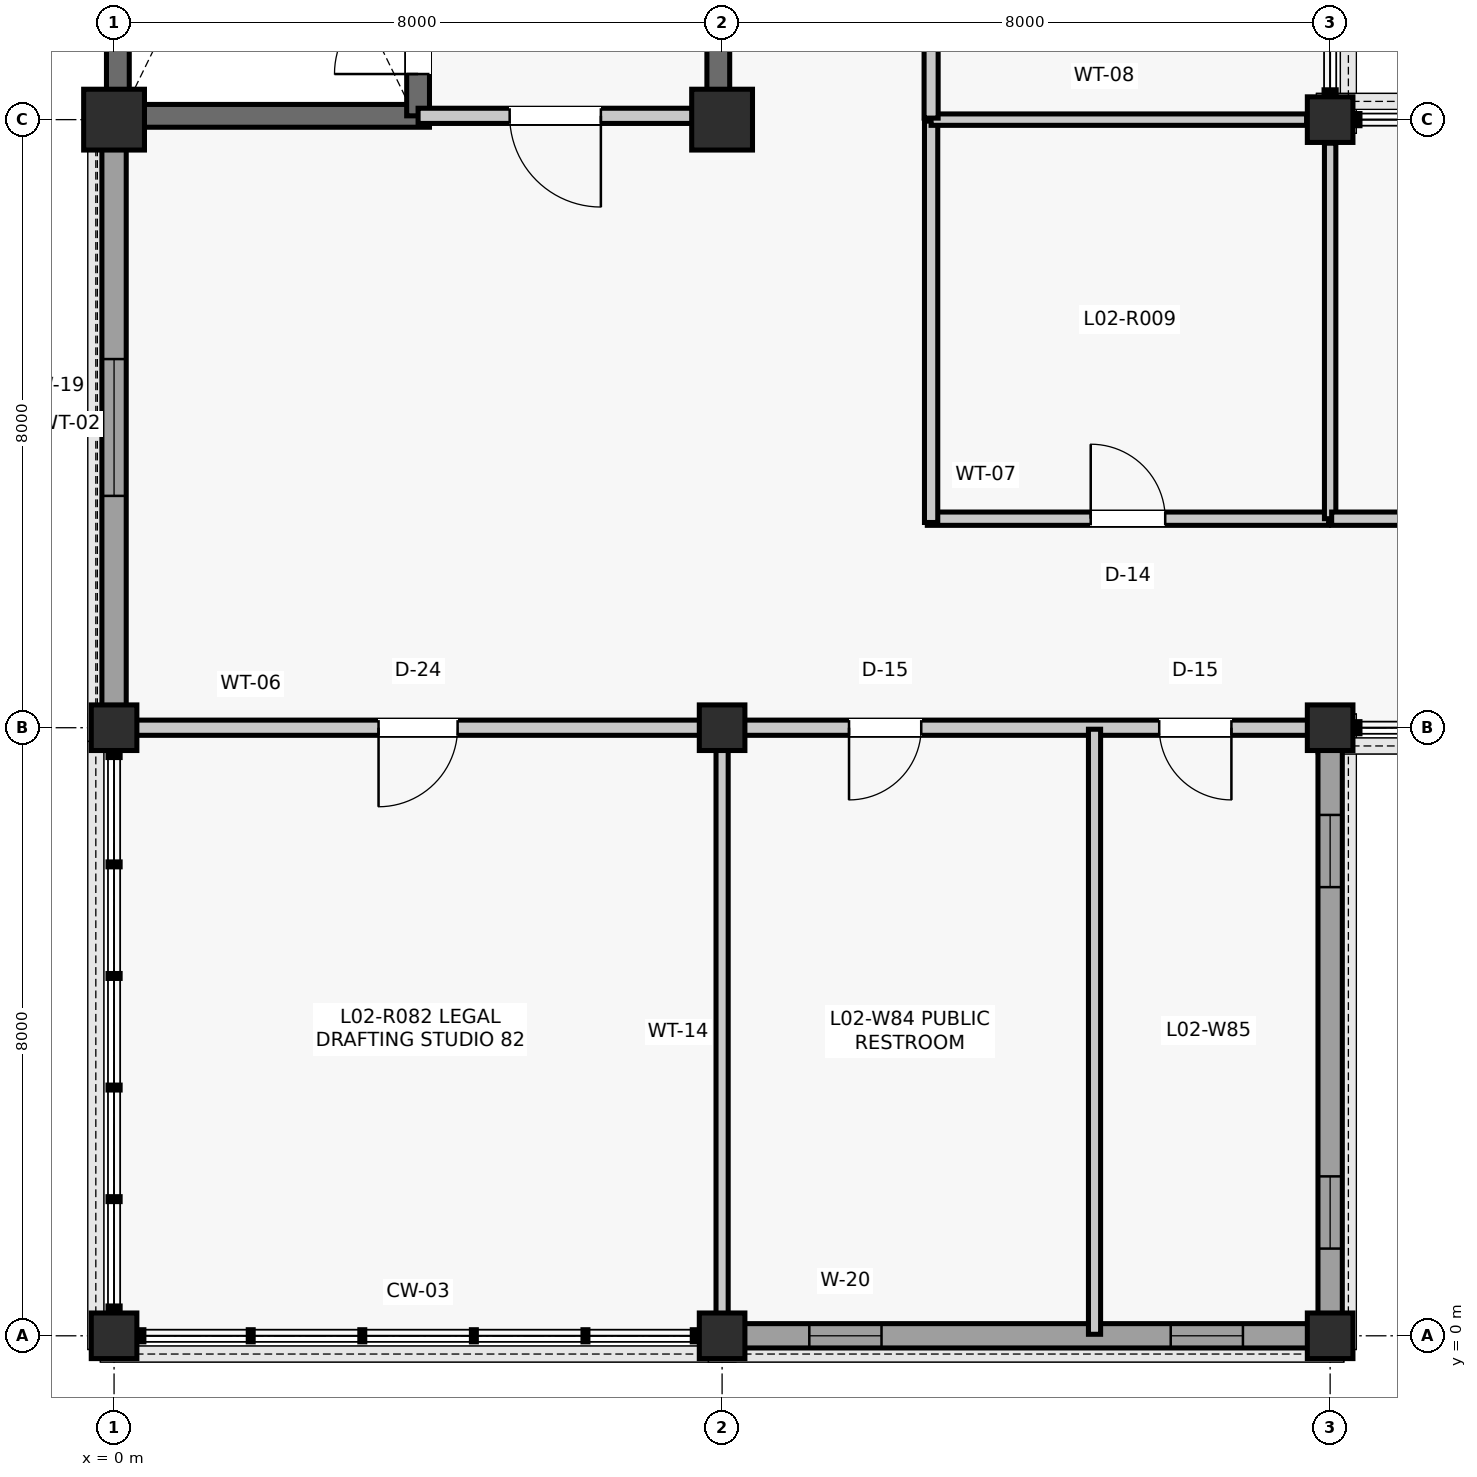
"""IFC4 building model, lengths in metres.
Left out: names, types, materials, properties, quantities, classifications, styles, units other than length and angle.
Written with IfcOpenShell. Run it as: python <this file> out.ifc"""

import sys

from ifc_helpers import new_model, si_unit, direction, frame, frame_2d, origin, origin_2d, place, context, subcontext, project, spatial, rectangle, extrude, element, fill, save


model = new_model("IFC4")
c1 = context("Model", 3, precision=1e-05, world=origin(), true_north=direction((0.0, 1.0)))
c2 = subcontext(c1, "Body", "Model", "MODEL_VIEW")
j1 = project(units=[si_unit("LENGTHUNIT", "METRE"), si_unit("PLANEANGLEUNIT", "RADIAN")], contexts=[c1])
p1 = place(None, origin())
s1 = spatial("IfcSite", under=j1, at=p1, CompositionType="ELEMENT")
p2 = place(p1, origin())
s2 = spatial("IfcBuilding", under=s1, at=p2, CompositionType="ELEMENT")
p3 = place(p2, frame((0.0, 0.0, 9.9)))
s3 = spatial("IfcBuildingStorey", under=s2, at=p3, CompositionType="ELEMENT", Elevation=9.9)
for number, where, z_axis, x_axis in (
    (1, (0.0, 0.0, 0.0), (0.0, 0.0, 1.0), (1.0, 0.0, 0.0)),
    (2, (0.0, 8.0, 0.0), (0.0, 0.0, 1.0), (1.0, 0.0, 0.0)),
):
    element("IfcColumn", number, at=place(p3, frame(where, z_axis=z_axis, x_axis=x_axis)), inside=s3, PredefinedType="COLUMN", context=c2, shape_type="SweptSolid", body=[
        extrude(rectangle(XDim=0.6, YDim=0.6, at=origin_2d()), origin(), (0.0, 0.0, 1.0), 3.96),
    ])
p4 = place(p3, frame((0.0, 16.0, 0.0), z_axis=(0.0, 0.0, 1.0), x_axis=(1.0, 0.0, 0.0)))
e3 = element("IfcColumn", 3, at=p4, inside=s3, PredefinedType="COLUMN", context=c2, shape_type="SweptSolid", body=[
    extrude(rectangle(XDim=0.8, YDim=0.8, at=origin_2d()), origin(), (0.0, 0.0, 1.0), 3.96),
])
for number, where, z_axis, x_axis in (
    (4, (8.0, 0.0, 0.0), (0.0, 0.0, 1.0), (1.0, 0.0, 0.0)),
    (5, (8.0, 8.0, 0.0), (0.0, 0.0, 1.0), (1.0, 0.0, 0.0)),
):
    element("IfcColumn", number, at=place(p3, frame(where, z_axis=z_axis, x_axis=x_axis)), inside=s3, PredefinedType="COLUMN", context=c2, shape_type="SweptSolid", body=[
        extrude(rectangle(XDim=0.6, YDim=0.6, at=origin_2d()), origin(), (0.0, 0.0, 1.0), 3.96),
    ])
p5 = place(p3, frame((8.0, 16.0, 0.0), z_axis=(0.0, 0.0, 1.0), x_axis=(1.0, 0.0, 0.0)))
e6 = element("IfcColumn", 6, at=p5, inside=s3, PredefinedType="COLUMN", context=c2, shape_type="SweptSolid", body=[
    extrude(rectangle(XDim=0.8, YDim=0.8, at=origin_2d()), origin(), (0.0, 0.0, 1.0), 3.96),
])
for number, where, z_axis, x_axis in (
    (7, (16.0, 0.0, 0.0), (0.0, 0.0, 1.0), (1.0, 0.0, 0.0)),
    (8, (16.0, 8.0, 0.0), (0.0, 0.0, 1.0), (1.0, 0.0, 0.0)),
    (9, (16.0, 16.0, 0.0), (0.0, 0.0, 1.0), (1.0, 0.0, 0.0)),
):
    element("IfcColumn", number, at=place(p3, frame(where, z_axis=z_axis, x_axis=x_axis)), inside=s3, PredefinedType="COLUMN", context=c2, shape_type="SweptSolid", body=[
        extrude(rectangle(XDim=0.6, YDim=0.6, at=origin_2d()), origin(), (0.0, 0.0, 1.0), 3.96),
    ])
p6 = place(p3, frame((0.0, 8.285, 0.0), z_axis=(0.0, 0.0, 1.0), x_axis=(0.0, 1.0, 0.0)))
e10 = element("IfcWall", 10, at=p6, inside=s3, PredefinedType="SOLIDWALL", context=c2, shape_type="SweptSolid", body=[
    extrude(rectangle(XDim=7.33, YDim=0.32, at=frame_2d((3.665, 0.0))), origin(), (0.0, 0.0, 1.0), 3.362),
])
p7 = place(p6, frame((2.765, 0.0, 1.35)))
e11 = element("IfcOpeningElement", 11, at=p7, cuts=e10, PredefinedType="OPENING", context=c2, shape_type="SweptSolid", body=[
    extrude(rectangle(XDim=1.8, YDim=1.2, at=frame_2d((0.9, 0.6))), frame((0.0, 0.17, 0.0), z_axis=(0.0, -1.0, 0.0), x_axis=(1.0, 0.0, 0.0)), (0.0, 0.0, 1.0), 0.34),
])
p8 = place(p3, frame((8.285, 0.0, 0.0), z_axis=(0.0, 0.0, 1.0), x_axis=(1.0, 0.0, 0.0)))
e12 = element("IfcWall", 12, at=p8, inside=s3, PredefinedType="SOLIDWALL", context=c2, shape_type="SweptSolid", body=[
    extrude(rectangle(XDim=7.43, YDim=0.32, at=frame_2d((3.715, 0.0))), origin(), (0.0, 0.0, 1.0), 3.362),
])
p9 = place(p8, frame((0.862, 0.0, 1.2)))
e13 = element("IfcOpeningElement", 13, at=p9, cuts=e12, PredefinedType="OPENING", context=c2, shape_type="SweptSolid", body=[
    extrude(rectangle(XDim=0.95, YDim=1.4, at=frame_2d((0.475, 0.7))), frame((0.0, 0.17, 0.0), z_axis=(0.0, -1.0, 0.0), x_axis=(1.0, 0.0, 0.0)), (0.0, 0.0, 1.0), 0.34),
])
p10 = place(p8, frame((5.618, 0.0, 1.2)))
e14 = element("IfcOpeningElement", 14, at=p10, cuts=e12, PredefinedType="OPENING", context=c2, shape_type="SweptSolid", body=[
    extrude(rectangle(XDim=0.95, YDim=1.4, at=frame_2d((0.475, 0.7))), frame((0.0, 0.17, 0.0), z_axis=(0.0, -1.0, 0.0), x_axis=(1.0, 0.0, 0.0)), (0.0, 0.0, 1.0), 0.34),
])
p11 = place(p3, frame((16.0, 0.285, 0.0), z_axis=(0.0, 0.0, 1.0), x_axis=(0.0, 1.0, 0.0)))
e15 = element("IfcWall", 15, at=p11, inside=s3, PredefinedType="SOLIDWALL", context=c2, shape_type="SweptSolid", body=[
    extrude(rectangle(XDim=7.43, YDim=0.32, at=frame_2d((3.715, 0.0))), origin(), (0.0, 0.0, 1.0), 3.295),
])
p12 = place(p11, frame((0.862, 0.0, 1.2)))
e16 = element("IfcOpeningElement", 16, at=p12, cuts=e15, PredefinedType="OPENING", context=c2, shape_type="SweptSolid", body=[
    extrude(rectangle(XDim=0.95, YDim=1.4, at=frame_2d((0.475, 0.7))), frame((0.0, 0.17, 0.0), z_axis=(0.0, -1.0, 0.0), x_axis=(1.0, 0.0, 0.0)), (0.0, 0.0, 1.0), 0.34),
])
p13 = place(p11, frame((5.618, 0.0, 1.2)))
e17 = element("IfcOpeningElement", 17, at=p13, cuts=e15, PredefinedType="OPENING", context=c2, shape_type="SweptSolid", body=[
    extrude(rectangle(XDim=0.95, YDim=1.4, at=frame_2d((0.475, 0.7))), frame((0.0, 0.17, 0.0), z_axis=(0.0, -1.0, 0.0), x_axis=(1.0, 0.0, 0.0)), (0.0, 0.0, 1.0), 0.34),
])
for number, where, z_axis, x_axis in (
    (18, (0.05, 16.29, 0.0), (0.0, 0.0, 1.0), (0.0, 1.0, 0.0)),
    (19, (7.95, 16.29, 0.0), (0.0, 0.0, 1.0), (0.0, 1.0, 0.0)),
):
    element("IfcWall", number, at=place(p3, frame(where, z_axis=z_axis, x_axis=x_axis)), inside=s3, PredefinedType="SHEAR", context=c2, shape_type="SweptSolid", body=[
        extrude(rectangle(XDim=7.42, YDim=0.3, at=frame_2d((3.71, 0.0))), origin(), (0.0, 0.0, 1.0), 3.705),
    ])
p14 = place(p3, frame((0.29, 16.05, 0.0), z_axis=(0.0, 0.0, 1.0), x_axis=(1.0, 0.0, 0.0)))
e20 = element("IfcWall", 20, at=p14, inside=s3, PredefinedType="SHEAR", context=c2, shape_type="SweptSolid", body=[
    extrude(rectangle(XDim=3.86, YDim=0.3, at=frame_2d((1.93, 0.0))), origin(), (0.0, 0.0, 1.0), 3.705),
])
p15 = place(p3, frame((4.0, 16.05, 0.0), z_axis=(0.0, 0.0, 1.0), x_axis=(0.0, 1.0, 0.0)))
e21 = element("IfcWall", 21, at=p15, inside=s3, PredefinedType="SHEAR", context=c2, shape_type="SweptSolid", body=[
    extrude(rectangle(XDim=7.9, YDim=0.3, at=frame_2d((3.95, 0.0))), origin(), (0.0, 0.0, 1.0), 3.705),
])
p16 = place(p15, frame((0.55, 0.0, 0.0)))
e22 = element("IfcOpeningElement", 22, at=p16, cuts=e21, PredefinedType="OPENING", context=c2, shape_type="SweptSolid", body=[
    extrude(rectangle(XDim=1.1, YDim=2.15, at=frame_2d((0.55, 1.075))), frame((0.0, 0.16, 0.0), z_axis=(0.0, -1.0, 0.0), x_axis=(1.0, 0.0, 0.0)), (0.0, 0.0, 1.0), 0.32),
])
p17 = place(p3, frame((4.0, 16.05, 0.0), z_axis=(0.0, 0.0, 1.0), x_axis=(1.0, 0.0, 0.0)))
e23 = element("IfcWall", 23, at=p17, inside=s3, PredefinedType="PARTITIONING", context=c2, shape_type="SweptSolid", body=[
    extrude(rectangle(XDim=3.61, YDim=0.2, at=frame_2d((1.805, 0.0))), origin(), (0.0, 0.0, 1.0), 3.156),
])
p18 = place(p17, frame((1.205, 0.0, 0.0)))
e24 = element("IfcOpeningElement", 24, at=p18, cuts=e23, PredefinedType="OPENING", context=c2, shape_type="SweptSolid", body=[
    extrude(rectangle(XDim=1.2, YDim=2.15, at=frame_2d((0.6, 1.075))), frame((0.0, 0.11, 0.0), z_axis=(0.0, -1.0, 0.0), x_axis=(1.0, 0.0, 0.0)), (0.0, 0.0, 1.0), 0.22),
])
p19 = place(p3, frame((10.7, 10.75, 0.0), z_axis=(0.0, 0.0, 1.0), x_axis=(1.0, 0.0, 0.0)))
e25 = element("IfcWall", 25, at=p19, inside=s3, PredefinedType="PARTITIONING", context=c2, shape_type="SweptSolid", body=[
    extrude(rectangle(XDim=5.28, YDim=0.175, at=frame_2d((2.64, 0.0))), origin(), (0.0, 0.0, 1.0), 3.236),
])
p20 = place(p19, frame((2.15, 0.0, 0.0)))
e26 = element("IfcOpeningElement", 26, at=p20, cuts=e25, PredefinedType="OPENING", context=c2, shape_type="SweptSolid", body=[
    extrude(rectangle(XDim=0.98, YDim=2.15, at=frame_2d((0.49, 1.075))), frame((0.0, 0.097, 0.0), z_axis=(0.0, -1.0, 0.0), x_axis=(1.0, 0.0, 0.0)), (0.0, 0.0, 1.0), 0.195),
])
p21 = place(p3, frame((10.75, 10.7, 0.0), z_axis=(0.0, 0.0, 1.0), x_axis=(0.0, 1.0, 0.0)))
e27 = element("IfcWall", 27, at=p21, inside=s3, PredefinedType="PARTITIONING", context=c2, shape_type="SweptSolid", body=[
    extrude(rectangle(XDim=5.28, YDim=0.175, at=frame_2d((2.64, 0.0))), origin(), (0.0, 0.0, 1.0), 3.166),
])
p22 = place(p3, frame((10.75, 16.0, 0.0), z_axis=(0.0, 0.0, 1.0), x_axis=(1.0, 0.0, 0.0)))
e28 = element("IfcWall", 28, at=p22, inside=s3, PredefinedType="PARTITIONING", context=c2, shape_type="SweptSolid", body=[
    extrude(rectangle(XDim=4.94, YDim=0.15, at=frame_2d((2.47, 0.0))), origin(), (0.0, 0.0, 1.0), 3.166),
])
p23 = place(p3, frame((16.0, 10.75, 0.0), z_axis=(0.0, 0.0, 1.0), x_axis=(0.0, 1.0, 0.0)))
e29 = element("IfcWall", 29, at=p23, inside=s3, PredefinedType="PARTITIONING", context=c2, shape_type="SweptSolid", body=[
    extrude(rectangle(XDim=4.94, YDim=0.15, at=frame_2d((2.47, 0.0))), origin(), (0.0, 0.0, 1.0), 3.236),
])
p24 = place(p3, frame((10.75, 16.02, 0.0), z_axis=(0.0, 0.0, 1.0), x_axis=(0.0, 1.0, 0.0)))
e30 = element("IfcWall", 30, at=p24, inside=s3, PredefinedType="PARTITIONING", context=c2, shape_type="SweptSolid", body=[
    extrude(rectangle(XDim=7.96, YDim=0.185, at=frame_2d((3.98, 0.0))), origin(), (0.0, 0.0, 1.0), 3.097),
])
p25 = place(p24, frame((3.47, 0.0, 0.0)))
e31 = element("IfcOpeningElement", 31, at=p25, cuts=e30, PredefinedType="OPENING", context=c2, shape_type="SweptSolid", body=[
    extrude(rectangle(XDim=1.02, YDim=2.2, at=frame_2d((0.51, 1.1))), frame((0.0, 0.103, 0.0), z_axis=(0.0, -1.0, 0.0), x_axis=(1.0, 0.0, 0.0)), (0.0, 0.0, 1.0), 0.205),
])
p26 = place(p3, frame((16.02, 10.75, 0.0), z_axis=(0.0, 0.0, 1.0), x_axis=(1.0, 0.0, 0.0)))
e32 = element("IfcWall", 32, at=p26, inside=s3, PredefinedType="PARTITIONING", context=c2, shape_type="SweptSolid", body=[
    extrude(rectangle(XDim=7.96, YDim=0.175, at=frame_2d((3.98, 0.0))), origin(), (0.0, 0.0, 1.0), 3.172),
])
p27 = place(p26, frame((3.355, 0.0, 0.0)))
e33 = element("IfcOpeningElement", 33, at=p27, cuts=e32, PredefinedType="OPENING", context=c2, shape_type="SweptSolid", body=[
    extrude(rectangle(XDim=1.25, YDim=2.18, at=frame_2d((0.625, 1.09))), frame((0.0, 0.097, 0.0), z_axis=(0.0, -1.0, 0.0), x_axis=(1.0, 0.0, 0.0)), (0.0, 0.0, 1.0), 0.195),
])
p28 = place(p3, frame((8.0, 0.29, 0.0), z_axis=(0.0, 0.0, 1.0), x_axis=(0.0, 1.0, 0.0)))
e34 = element("IfcWall", 34, at=p28, inside=s3, PredefinedType="PARTITIONING", context=c2, shape_type="SweptSolid", body=[
    extrude(rectangle(XDim=7.42, YDim=0.16, at=frame_2d((3.71, 0.0))), origin(), (0.0, 0.0, 1.0), 3.242),
])
p29 = place(p3, frame((0.29, 8.0, 0.0), z_axis=(0.0, 0.0, 1.0), x_axis=(1.0, 0.0, 0.0)))
e35 = element("IfcWall", 35, at=p29, inside=s3, PredefinedType="PARTITIONING", context=c2, shape_type="SweptSolid", body=[
    extrude(rectangle(XDim=7.42, YDim=0.2, at=frame_2d((3.71, 0.0))), origin(), (0.0, 0.0, 1.0), 3.172),
])
p30 = place(p29, frame((3.19, 0.0, 0.0)))
e36 = element("IfcOpeningElement", 36, at=p30, cuts=e35, PredefinedType="OPENING", context=c2, shape_type="SweptSolid", body=[
    extrude(rectangle(XDim=1.04, YDim=2.18, at=frame_2d((0.52, 1.09))), frame((0.0, 0.11, 0.0), z_axis=(0.0, -1.0, 0.0), x_axis=(1.0, 0.0, 0.0)), (0.0, 0.0, 1.0), 0.22),
])
p31 = place(p3, frame((8.29, 8.0, 0.0), z_axis=(0.0, 0.0, 1.0), x_axis=(1.0, 0.0, 0.0)))
e37 = element("IfcWall", 37, at=p31, inside=s3, PredefinedType="PARTITIONING", context=c2, shape_type="SweptSolid", body=[
    extrude(rectangle(XDim=7.42, YDim=0.2, at=frame_2d((3.71, 0.0))), origin(), (0.0, 0.0, 1.0), 3.156),
])
p32 = place(p31, frame((1.38, 0.0, 0.0)))
e38 = element("IfcOpeningElement", 38, at=p32, cuts=e37, PredefinedType="OPENING", context=c2, shape_type="SweptSolid", body=[
    extrude(rectangle(XDim=0.95, YDim=2.1, at=frame_2d((0.475, 1.05))), frame((0.0, 0.11, 0.0), z_axis=(0.0, -1.0, 0.0), x_axis=(1.0, 0.0, 0.0)), (0.0, 0.0, 1.0), 0.22),
])
p33 = place(p31, frame((5.461, 0.0, 0.0)))
e39 = element("IfcOpeningElement", 39, at=p33, cuts=e37, PredefinedType="OPENING", context=c2, shape_type="SweptSolid", body=[
    extrude(rectangle(XDim=0.95, YDim=2.1, at=frame_2d((0.475, 1.05))), frame((0.0, 0.11, 0.0), z_axis=(0.0, -1.0, 0.0), x_axis=(1.0, 0.0, 0.0)), (0.0, 0.0, 1.0), 0.22),
])
p34 = place(p3, frame((12.9, 0.02, 0.0), z_axis=(0.0, 0.0, 1.0), x_axis=(0.0, 1.0, 0.0)))
e40 = element("IfcWall", 40, at=p34, inside=s3, PredefinedType="PARTITIONING", context=c2, shape_type="SweptSolid", body=[
    extrude(rectangle(XDim=7.96, YDim=0.16, at=frame_2d((3.98, 0.0))), origin(), (0.0, 0.0, 1.0), 3.156),
])
p35 = place(p7, origin())
e41 = element("IfcWindow", 41, at=p35, inside=s3, PartitioningType="SINGLE_PANEL", PredefinedType="WINDOW", context=c2, shape_type="SweptSolid", body=[
    extrude(rectangle(XDim=1.8, YDim=1.2, at=frame_2d((0.9, 0.6))), frame((0.0, 0.03, 0.0), z_axis=(0.0, -1.0, 0.0), x_axis=(1.0, 0.0, 0.0)), (0.0, 0.0, 1.0), 0.06),
])
fill(e11, e41)
p36 = place(p9, origin())
e42 = element("IfcWindow", 42, at=p36, inside=s3, PartitioningType="SINGLE_PANEL", PredefinedType="WINDOW", context=c2, shape_type="SweptSolid", body=[
    extrude(rectangle(XDim=0.95, YDim=1.4, at=frame_2d((0.475, 0.7))), frame((0.0, 0.03, 0.0), z_axis=(0.0, -1.0, 0.0), x_axis=(1.0, 0.0, 0.0)), (0.0, 0.0, 1.0), 0.06),
])
fill(e13, e42)
p37 = place(p10, origin())
e43 = element("IfcWindow", 43, at=p37, inside=s3, PartitioningType="SINGLE_PANEL", PredefinedType="WINDOW", context=c2, shape_type="SweptSolid", body=[
    extrude(rectangle(XDim=0.95, YDim=1.4, at=frame_2d((0.475, 0.7))), frame((0.0, 0.03, 0.0), z_axis=(0.0, -1.0, 0.0), x_axis=(1.0, 0.0, 0.0)), (0.0, 0.0, 1.0), 0.06),
])
fill(e14, e43)
p38 = place(p12, origin())
e44 = element("IfcWindow", 44, at=p38, inside=s3, PartitioningType="SINGLE_PANEL", PredefinedType="WINDOW", context=c2, shape_type="SweptSolid", body=[
    extrude(rectangle(XDim=0.95, YDim=1.4, at=frame_2d((0.475, 0.7))), frame((0.0, 0.03, 0.0), z_axis=(0.0, -1.0, 0.0), x_axis=(1.0, 0.0, 0.0)), (0.0, 0.0, 1.0), 0.06),
])
fill(e16, e44)
p39 = place(p13, origin())
e45 = element("IfcWindow", 45, at=p39, inside=s3, PartitioningType="SINGLE_PANEL", PredefinedType="WINDOW", context=c2, shape_type="SweptSolid", body=[
    extrude(rectangle(XDim=0.95, YDim=1.4, at=frame_2d((0.475, 0.7))), frame((0.0, 0.03, 0.0), z_axis=(0.0, -1.0, 0.0), x_axis=(1.0, 0.0, 0.0)), (0.0, 0.0, 1.0), 0.06),
])
fill(e17, e45)
p40 = place(p16, origin())
e46 = element("IfcDoor", 46, at=p40, inside=s3, OperationType="SINGLE_SWING_LEFT", PredefinedType="DOOR", context=c2, shape_type="SweptSolid", body=[
    extrude(rectangle(XDim=1.1, YDim=2.15, at=frame_2d((0.55, 1.075))), frame((0.0, 0.025, 0.0), z_axis=(0.0, -1.0, 0.0), x_axis=(1.0, 0.0, 0.0)), (0.0, 0.0, 1.0), 0.05),
])
fill(e22, e46)
p41 = place(p18, frame((1.2, 0.0, 0.0), z_axis=(0.0, 0.0, 1.0), x_axis=(-1.0, 0.0, 0.0)))
e47 = element("IfcDoor", 47, at=p41, inside=s3, OperationType="SINGLE_SWING_RIGHT", PredefinedType="DOOR", context=c2, shape_type="SweptSolid", body=[
    extrude(rectangle(XDim=1.2, YDim=2.15, at=frame_2d((0.6, 1.075))), frame((0.0, 0.025, 0.0), z_axis=(0.0, -1.0, 0.0), x_axis=(1.0, 0.0, 0.0)), (0.0, 0.0, 1.0), 0.05),
])
fill(e24, e47)
p42 = place(p20, origin())
e48 = element("IfcDoor", 48, at=p42, inside=s3, OperationType="SINGLE_SWING_LEFT", PredefinedType="DOOR", context=c2, shape_type="SweptSolid", body=[
    extrude(rectangle(XDim=0.98, YDim=2.15, at=frame_2d((0.49, 1.075))), frame((0.0, 0.025, 0.0), z_axis=(0.0, -1.0, 0.0), x_axis=(1.0, 0.0, 0.0)), (0.0, 0.0, 1.0), 0.05),
])
fill(e26, e48)
p43 = place(p30, frame((1.04, 0.0, 0.0), z_axis=(0.0, 0.0, 1.0), x_axis=(-1.0, 0.0, 0.0)))
e49 = element("IfcDoor", 49, at=p43, inside=s3, OperationType="SINGLE_SWING_LEFT", PredefinedType="DOOR", context=c2, shape_type="SweptSolid", body=[
    extrude(rectangle(XDim=1.04, YDim=2.18, at=frame_2d((0.52, 1.09))), frame((0.0, 0.025, 0.0), z_axis=(0.0, -1.0, 0.0), x_axis=(1.0, 0.0, 0.0)), (0.0, 0.0, 1.0), 0.05),
])
fill(e36, e49)
p44 = place(p32, frame((0.95, 0.0, 0.0), z_axis=(0.0, 0.0, 1.0), x_axis=(-1.0, 0.0, 0.0)))
e50 = element("IfcDoor", 50, at=p44, inside=s3, OperationType="SINGLE_SWING_LEFT", PredefinedType="DOOR", context=c2, shape_type="SweptSolid", body=[
    extrude(rectangle(XDim=0.95, YDim=2.1, at=frame_2d((0.475, 1.05))), frame((0.0, 0.025, 0.0), z_axis=(0.0, -1.0, 0.0), x_axis=(1.0, 0.0, 0.0)), (0.0, 0.0, 1.0), 0.05),
])
fill(e38, e50)
p45 = place(p33, frame((0.95, 0.0, 0.0), z_axis=(0.0, 0.0, 1.0), x_axis=(-1.0, 0.0, 0.0)))
e51 = element("IfcDoor", 51, at=p45, inside=s3, OperationType="SINGLE_SWING_RIGHT", PredefinedType="DOOR", context=c2, shape_type="SweptSolid", body=[
    extrude(rectangle(XDim=0.95, YDim=2.1, at=frame_2d((0.475, 1.05))), frame((0.0, 0.025, 0.0), z_axis=(0.0, -1.0, 0.0), x_axis=(1.0, 0.0, 0.0)), (0.0, 0.0, 1.0), 0.05),
])
fill(e39, e51)
save(model, sys.argv[1])
